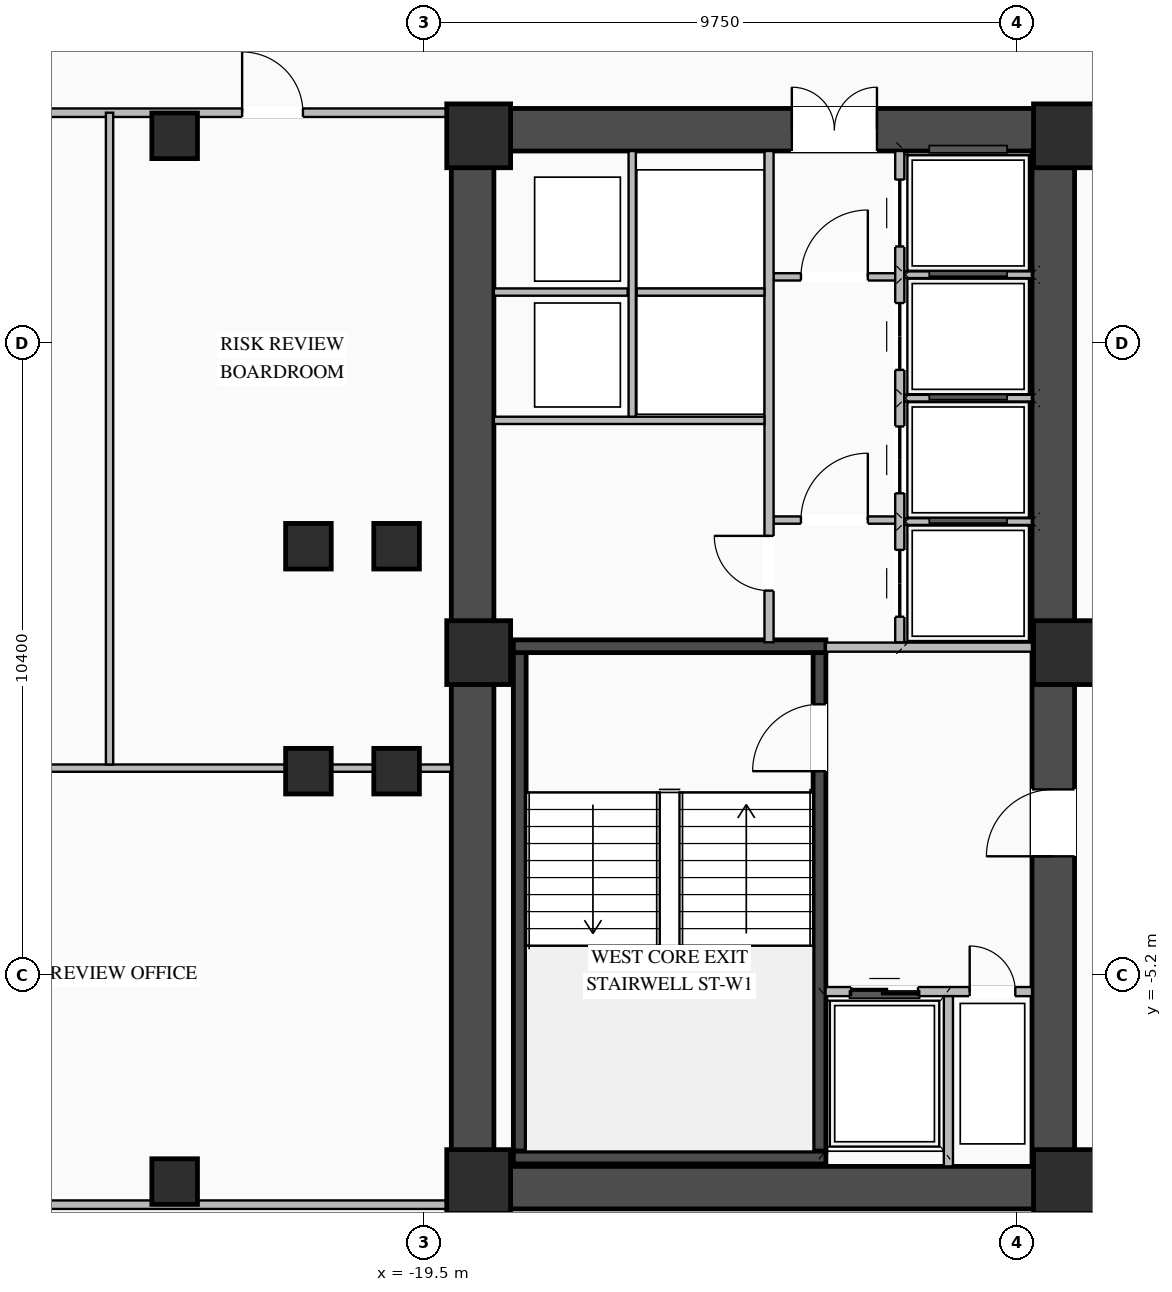
"""IFC4 building model, lengths in metres.
Left out: names, types, materials, properties, quantities, classifications, styles, units other than length and angle.
Written with IfcOpenShell. Run it as: python <this file> out.ifc"""

import sys

from ifc_helpers import new_model, si_unit, direction, frame, frame_2d, origin, origin_2d, place, context, subcontext, project, spatial, rectangle, i_section, extrude, element, fill, save


model = new_model("IFC4")
c1 = context("Model", 3, precision=1e-05, world=origin(), true_north=direction((0.0, 1.0)))
c2 = subcontext(c1, "Body", "Model", "MODEL_VIEW")
j1 = project(units=[si_unit("LENGTHUNIT", "METRE"), si_unit("PLANEANGLEUNIT", "RADIAN")], contexts=[c1])
p1 = place(None, origin())
s1 = spatial("IfcSite", under=j1, at=p1, CompositionType="ELEMENT")
p2 = place(p1, origin())
s2 = spatial("IfcBuilding", under=s1, at=p2, CompositionType="ELEMENT")
p3 = place(p2, frame((0.0, 0.0, 94.9)))
s3 = spatial("IfcBuildingStorey", under=s2, at=p3, CompositionType="ELEMENT", Elevation=94.9)
p4 = place(p3, frame((-19.05, -8.7, 0.0), z_axis=(0.0, 0.0, 1.0), x_axis=(1.0, 0.0, 0.0)))
e1 = element("IfcWall", 1, at=p4, inside=s3, PredefinedType="SHEAR", context=c2, shape_type="SweptSolid", body=[
    extrude(rectangle(XDim=10.25, YDim=0.7, at=frame_2d((5.125, 0.0))), origin(), (0.0, 0.0, 1.0), 3.27),
])
p5 = place(p3, frame((-19.05, 8.7, 0.0), z_axis=(0.0, 0.0, 1.0), x_axis=(1.0, 0.0, 0.0)))
e2 = element("IfcWall", 2, at=p5, inside=s3, PredefinedType="SHEAR", context=c2, shape_type="SweptSolid", body=[
    extrude(rectangle(XDim=10.25, YDim=0.7, at=frame_2d((5.125, 0.0))), origin(), (0.0, 0.0, 1.0), 3.27),
])
p6 = place(p5, frame((5.6, 0.0, 0.0)))
e3 = element("IfcOpeningElement", 3, at=p6, cuts=e2, PredefinedType="OPENING", context=c2, shape_type="SweptSolid", body=[
    extrude(rectangle(XDim=1.4, YDim=2.05, at=frame_2d((0.7, 1.025))), frame((0.0, 0.36, 0.0), z_axis=(0.0, -1.0, 0.0), x_axis=(1.0, 0.0, 0.0)), (0.0, 0.0, 1.0), 0.72),
])
p7 = place(p3, frame((-18.7, -8.35, 0.0), z_axis=(0.0, 0.0, 1.0), x_axis=(0.0, 1.0, 0.0)))
e4 = element("IfcWall", 4, at=p7, inside=s3, PredefinedType="SHEAR", context=c2, shape_type="SweptSolid", body=[
    extrude(rectangle(XDim=16.7, YDim=0.7, at=frame_2d((8.35, 0.0))), origin(), (0.0, 0.0, 1.0), 3.27),
])
p8 = place(p3, frame((-9.15, -8.35, 0.0), z_axis=(0.0, 0.0, 1.0), x_axis=(0.0, 1.0, 0.0)))
e5 = element("IfcWall", 5, at=p8, inside=s3, PredefinedType="SHEAR", context=c2, shape_type="SweptSolid", body=[
    extrude(rectangle(XDim=16.7, YDim=0.7, at=frame_2d((8.35, 0.0))), origin(), (0.0, 0.0, 1.0), 3.27),
])
p9 = place(p8, frame((5.1, 0.0, 0.0)))
e6 = element("IfcOpeningElement", 6, at=p9, cuts=e5, PredefinedType="OPENING", context=c2, shape_type="SweptSolid", body=[
    extrude(rectangle(XDim=1.1, YDim=2.08, at=frame_2d((0.55, 1.04))), frame((0.0, 0.36, 0.0), z_axis=(0.0, -1.0, 0.0), x_axis=(1.0, 0.0, 0.0)), (0.0, 0.0, 1.0), 0.72),
])
p10 = place(p3, frame((-12.995, -8.1, 0.0), z_axis=(0.0, 0.0, 1.0), x_axis=(0.0, 1.0, 0.0)))
e7 = element("IfcWall", 7, at=p10, inside=s3, PredefinedType="SHEAR", context=c2, shape_type="SweptSolid", body=[
    extrude(rectangle(XDim=8.2, YDim=0.21, at=frame_2d((4.1, 0.0))), origin(), (0.0, 0.0, 1.0), 3.27),
])
p11 = place(p10, frame((6.25, 0.0, 0.0)))
e8 = element("IfcOpeningElement", 8, at=p11, cuts=e7, PredefinedType="OPENING", context=c2, shape_type="SweptSolid", body=[
    extrude(rectangle(XDim=1.1, YDim=2.15, at=frame_2d((0.55, 1.075))), frame((0.0, 0.115, 0.0), z_axis=(0.0, -1.0, 0.0), x_axis=(1.0, 0.0, 0.0)), (0.0, 0.0, 1.0), 0.23),
])
p12 = place(p3, frame((-17.925, -8.1, 0.0), z_axis=(0.0, 0.0, 1.0), x_axis=(0.0, 1.0, 0.0)))
e9 = element("IfcWall", 9, at=p12, inside=s3, PredefinedType="SHEAR", context=c2, shape_type="SweptSolid", body=[
    extrude(rectangle(XDim=8.2, YDim=0.21, at=frame_2d((4.1, 0.0))), origin(), (0.0, 0.0, 1.0), 3.27),
])
for number, where, z_axis, x_axis in (
    (10, (-18.03, -8.205, 0.0), (0.0, 0.0, 1.0), (1.0, 0.0, 0.0)),
    (11, (-12.89, 0.205, 0.0), (0.0, 0.0, 1.0), (-1.0, 0.0, 0.0)),
):
    element("IfcWall", number, at=place(p3, frame(where, z_axis=z_axis, x_axis=x_axis)), inside=s3, PredefinedType="SHEAR", context=c2, shape_type="SweptSolid", body=[
        extrude(rectangle(XDim=5.14, YDim=0.21, at=frame_2d((2.57, 0.0))), origin(), (0.0, 0.0, 1.0), 3.27),
    ])
for number, where, z_axis, x_axis in (
    (12, (-8.95, -8.6, 0.0), (0.0, 0.0, 1.0), (1.0, 0.0, 0.0)),
    (13, (-8.95, 0.1, 0.0), (0.0, 0.0, 1.0), (1.0, 0.0, 0.0)),
    (14, (-8.95, 8.6, 0.0), (0.0, 0.0, 1.0), (1.0, 0.0, 0.0)),
    (15, (-18.6, -8.6, 0.0), (0.0, 0.0, 1.0), (1.0, 0.0, 0.0)),
    (16, (-18.6, 0.1, 0.0), (0.0, 0.0, 1.0), (1.0, 0.0, 0.0)),
    (17, (-18.6, 8.6, 0.0), (0.0, 0.0, 1.0), (1.0, 0.0, 0.0)),
):
    element("IfcColumn", number, at=place(p3, frame(where, z_axis=z_axis, x_axis=x_axis)), inside=s3, PredefinedType="COLUMN", context=c2, shape_type="SweptSolid", body=[
        extrude(rectangle(XDim=1.05, YDim=1.05, at=origin_2d()), origin(), (0.0, 0.0, 1.0), 3.45),
    ])
for number, where, z_axis, x_axis in (
    (18, (-21.4, -1.85, 0.0), (0.0, 0.0, 1.0), (1.0, 0.0, 0.0)),
    (19, (-21.4, 1.85, 0.0), (0.0, 0.0, 1.0), (1.0, 0.0, 0.0)),
    (20, (-19.95, -1.85, 0.0), (0.0, 0.0, 1.0), (1.0, 0.0, 0.0)),
    (21, (-19.95, 1.85, 0.0), (0.0, 0.0, 1.0), (1.0, 0.0, 0.0)),
    (22, (-23.6, -8.6, 0.0), (0.0, 0.0, 1.0), (1.0, 0.0, 0.0)),
    (23, (-23.6, 8.6, 0.0), (0.0, 0.0, 1.0), (1.0, 0.0, 0.0)),
):
    element("IfcColumn", number, at=place(p3, frame(where, z_axis=z_axis, x_axis=x_axis)), inside=s3, PredefinedType="COLUMN", context=c2, shape_type="SweptSolid", body=[
        extrude(i_section(OverallWidth=0.75, OverallDepth=0.75, WebThickness=0.03, FlangeThickness=0.044, at=origin_2d()), origin(), (0.0, 0.0, 1.0), 3.45),
    ])
p13 = place(p3, frame((-12.895, -5.475, 0.0), z_axis=(0.0, 0.0, 1.0), x_axis=(1.0, 0.0, 0.0)))
e24 = element("IfcWall", 24, at=p13, inside=s3, PredefinedType="STANDARD", context=c2, shape_type="SweptSolid", body=[
    extrude(rectangle(XDim=3.395, YDim=0.15, at=frame_2d((1.698, 0.0))), origin(), (0.0, 0.0, 1.0), 3.25),
])
p14 = place(p13, frame((0.42, 0.0, 0.0)))
e25 = element("IfcOpeningElement", 25, at=p14, cuts=e24, PredefinedType="OPENING", context=c2, shape_type="SweptSolid", body=[
    extrude(rectangle(XDim=1.1, YDim=2.15, at=frame_2d((0.55, 1.075))), frame((0.0, 0.085, 0.0), z_axis=(0.0, -1.0, 0.0), x_axis=(1.0, 0.0, 0.0)), (0.0, 0.0, 1.0), 0.17),
])
p15 = place(p13, frame((2.37, 0.0, 0.0)))
e26 = element("IfcOpeningElement", 26, at=p15, cuts=e24, PredefinedType="OPENING", context=c2, shape_type="SweptSolid", body=[
    extrude(rectangle(XDim=0.75, YDim=2.05, at=frame_2d((0.375, 1.025))), frame((0.0, 0.085, 0.0), z_axis=(0.0, -1.0, 0.0), x_axis=(1.0, 0.0, 0.0)), (0.0, 0.0, 1.0), 0.17),
])
p16 = place(p3, frame((-10.875, -8.35, 0.0), z_axis=(0.0, 0.0, 1.0), x_axis=(0.0, 1.0, 0.0)))
e27 = element("IfcWall", 27, at=p16, inside=s3, PredefinedType="STANDARD", context=c2, shape_type="SweptSolid", body=[
    extrude(rectangle(XDim=2.8, YDim=0.15, at=frame_2d((1.4, 0.0))), origin(), (0.0, 0.0, 1.0), 3.25),
])
p17 = place(p3, frame((-12.89, 0.19, 0.0), z_axis=(0.0, 0.0, 1.0), x_axis=(1.0, 0.0, 0.0)))
e28 = element("IfcWall", 28, at=p17, inside=s3, PredefinedType="STANDARD", context=c2, shape_type="SweptSolid", body=[
    extrude(rectangle(XDim=3.39, YDim=0.15, at=frame_2d((1.695, 0.0))), origin(), (0.0, 0.0, 1.0), 2.645),
])
p18 = place(p3, frame((-13.75, 2.28, 0.0), z_axis=(0.0, 0.0, 1.0), x_axis=(1.0, 0.0, 0.0)))
e29 = element("IfcWall", 29, at=p18, inside=s3, PredefinedType="STANDARD", context=c2, shape_type="SweptSolid", body=[
    extrude(rectangle(XDim=2.0, YDim=0.12, at=frame_2d((1.0, 0.0))), origin(), (0.0, 0.0, 1.0), 3.25),
])
p19 = place(p18, frame((0.45, 0.0, 0.0)))
e30 = element("IfcOpeningElement", 30, at=p19, cuts=e29, PredefinedType="OPENING", context=c2, shape_type="SweptSolid", body=[
    extrude(rectangle(XDim=1.1, YDim=2.1, at=frame_2d((0.55, 1.05))), frame((0.0, 0.07, 0.0), z_axis=(0.0, -1.0, 0.0), x_axis=(1.0, 0.0, 0.0)), (0.0, 0.0, 1.0), 0.14),
])
p20 = place(p3, frame((-13.75, 6.28, 0.0), z_axis=(0.0, 0.0, 1.0), x_axis=(1.0, 0.0, 0.0)))
e31 = element("IfcWall", 31, at=p20, inside=s3, PredefinedType="STANDARD", context=c2, shape_type="SweptSolid", body=[
    extrude(rectangle(XDim=2.0, YDim=0.12, at=frame_2d((1.0, 0.0))), origin(), (0.0, 0.0, 1.0), 3.25),
])
p21 = place(p20, frame((0.45, 0.0, 0.0)))
e32 = element("IfcOpeningElement", 32, at=p21, cuts=e31, PredefinedType="OPENING", context=c2, shape_type="SweptSolid", body=[
    extrude(rectangle(XDim=1.1, YDim=2.1, at=frame_2d((0.55, 1.05))), frame((0.0, 0.07, 0.0), z_axis=(0.0, -1.0, 0.0), x_axis=(1.0, 0.0, 0.0)), (0.0, 0.0, 1.0), 0.14),
])
p22 = place(p3, frame((-11.675, 0.27, 0.0), z_axis=(0.0, 0.0, 1.0), x_axis=(0.0, 1.0, 0.0)))
e33 = element("IfcWall", 33, at=p22, inside=s3, PredefinedType="STANDARD", context=c2, shape_type="SweptSolid", body=[
    extrude(rectangle(XDim=8.08, YDim=0.15, at=frame_2d((4.04, 0.0))), origin(), (0.0, 0.0, 1.0), 3.25),
])
p23 = place(p22, frame((0.42, 0.0, 0.0)))
e34 = element("IfcOpeningElement", 34, at=p23, cuts=e33, PredefinedType="OPENING", context=c2, shape_type="SweptSolid", body=[
    extrude(rectangle(XDim=1.1, YDim=2.1, at=frame_2d((0.55, 1.05))), frame((0.0, 0.085, 0.0), z_axis=(0.0, -1.0, 0.0), x_axis=(1.0, 0.0, 0.0)), (0.0, 0.0, 1.0), 0.17),
])
p24 = place(p22, frame((2.45, 0.0, 0.0)))
e35 = element("IfcOpeningElement", 35, at=p24, cuts=e33, PredefinedType="OPENING", context=c2, shape_type="SweptSolid", body=[
    extrude(rectangle(XDim=1.1, YDim=2.1, at=frame_2d((0.55, 1.05))), frame((0.0, 0.085, 0.0), z_axis=(0.0, -1.0, 0.0), x_axis=(1.0, 0.0, 0.0)), (0.0, 0.0, 1.0), 0.17),
])
p25 = place(p22, frame((4.48, 0.0, 0.0)))
e36 = element("IfcOpeningElement", 36, at=p25, cuts=e33, PredefinedType="OPENING", context=c2, shape_type="SweptSolid", body=[
    extrude(rectangle(XDim=1.1, YDim=2.1, at=frame_2d((0.55, 1.05))), frame((0.0, 0.085, 0.0), z_axis=(0.0, -1.0, 0.0), x_axis=(1.0, 0.0, 0.0)), (0.0, 0.0, 1.0), 0.17),
])
p26 = place(p22, frame((6.51, 0.0, 0.0)))
e37 = element("IfcOpeningElement", 37, at=p26, cuts=e33, PredefinedType="OPENING", context=c2, shape_type="SweptSolid", body=[
    extrude(rectangle(XDim=1.1, YDim=2.1, at=frame_2d((0.55, 1.05))), frame((0.0, 0.085, 0.0), z_axis=(0.0, -1.0, 0.0), x_axis=(1.0, 0.0, 0.0)), (0.0, 0.0, 1.0), 0.17),
])
for number, where, z_axis, x_axis in (
    (38, (-11.6, 2.255, 0.0), (0.0, 0.0, 1.0), (1.0, 0.0, 0.0)),
    (39, (-11.6, 4.285, 0.0), (0.0, 0.0, 1.0), (1.0, 0.0, 0.0)),
    (40, (-11.6, 6.315, 0.0), (0.0, 0.0, 1.0), (1.0, 0.0, 0.0)),
):
    element("IfcWall", number, at=place(p3, frame(where, z_axis=z_axis, x_axis=x_axis)), inside=s3, PredefinedType="STANDARD", context=c2, shape_type="SweptSolid", body=[
        extrude(rectangle(XDim=2.1, YDim=0.11, at=frame_2d((1.05, 0.0))), origin(), (0.0, 0.0, 1.0), 3.25),
    ])
p27 = place(p3, frame((-13.825, 0.27, 0.0), z_axis=(0.0, 0.0, 1.0), x_axis=(0.0, 1.0, 0.0)))
e41 = element("IfcWall", 41, at=p27, inside=s3, PredefinedType="STANDARD", context=c2, shape_type="SweptSolid", body=[
    extrude(rectangle(XDim=8.08, YDim=0.15, at=frame_2d((4.04, 0.0))), origin(), (0.0, 0.0, 1.0), 3.25),
])
p28 = place(p27, frame((0.85, 0.0, 0.0)))
e42 = element("IfcOpeningElement", 42, at=p28, cuts=e41, PredefinedType="OPENING", context=c2, shape_type="SweptSolid", body=[
    extrude(rectangle(XDim=0.9, YDim=2.05, at=frame_2d((0.45, 1.025))), frame((0.0, 0.085, 0.0), z_axis=(0.0, -1.0, 0.0), x_axis=(1.0, 0.0, 0.0)), (0.0, 0.0, 1.0), 0.17),
])
p29 = place(p3, frame((-18.35, 3.92, 0.0), z_axis=(0.0, 0.0, 1.0), x_axis=(1.0, 0.0, 0.0)))
e43 = element("IfcWall", 43, at=p29, inside=s3, PredefinedType="STANDARD", context=c2, shape_type="SweptSolid", body=[
    extrude(rectangle(XDim=4.45, YDim=0.12, at=frame_2d((2.225, 0.0))), origin(), (0.0, 0.0, 1.0), 3.25),
])
p30 = place(p3, frame((-18.35, 6.03, 0.0), z_axis=(0.0, 0.0, 1.0), x_axis=(1.0, 0.0, 0.0)))
e44 = element("IfcWall", 44, at=p30, inside=s3, PredefinedType="STANDARD", context=c2, shape_type="SweptSolid", body=[
    extrude(rectangle(XDim=2.2, YDim=0.12, at=frame_2d((1.1, 0.0))), origin(), (0.0, 0.0, 1.0), 3.25),
])
p31 = place(p3, frame((-16.075, 3.98, 0.0), z_axis=(0.0, 0.0, 1.0), x_axis=(0.0, 1.0, 0.0)))
e45 = element("IfcWall", 45, at=p31, inside=s3, PredefinedType="STANDARD", context=c2, shape_type="SweptSolid", body=[
    extrude(rectangle(XDim=4.37, YDim=0.12, at=frame_2d((2.185, 0.0))), origin(), (0.0, 0.0, 1.0), 3.25),
])
p32 = place(p3, frame((-16.0, 6.03, 0.0), z_axis=(0.0, 0.0, 1.0), x_axis=(1.0, 0.0, 0.0)))
e46 = element("IfcWall", 46, at=p32, inside=s3, PredefinedType="STANDARD", context=c2, shape_type="SweptSolid", body=[
    extrude(rectangle(XDim=2.1, YDim=0.12, at=frame_2d((1.05, 0.0))), origin(), (0.0, 0.0, 1.0), 3.25),
])
p33 = place(p3, frame((-30.351, 8.98, 0.0), z_axis=(0.0, 0.0, 1.0), x_axis=(1.0, 0.0, 0.0)))
e47 = element("IfcWall", 47, at=p33, inside=s3, PredefinedType="STANDARD", context=c2, shape_type="SweptSolid", body=[
    extrude(rectangle(XDim=11.301, YDim=0.14, at=frame_2d((5.651, 0.0))), origin(), (0.0, 0.0, 1.0), 3.25),
])
p34 = place(p33, frame((2.9, 0.0, 0.0)))
e48 = element("IfcOpeningElement", 48, at=p34, cuts=e47, PredefinedType="OPENING", context=c2, shape_type="SweptSolid", body=[
    extrude(rectangle(XDim=1.0, YDim=2.08, at=frame_2d((0.5, 1.04))), frame((0.0, 0.08, 0.0), z_axis=(0.0, -1.0, 0.0), x_axis=(1.0, 0.0, 0.0)), (0.0, 0.0, 1.0), 0.16),
])
p35 = place(p33, frame((7.861, 0.0, 0.0)))
e49 = element("IfcOpeningElement", 49, at=p35, cuts=e47, PredefinedType="OPENING", context=c2, shape_type="SweptSolid", body=[
    extrude(rectangle(XDim=1.0, YDim=2.08, at=frame_2d((0.5, 1.04))), frame((0.0, 0.08, 0.0), z_axis=(0.0, -1.0, 0.0), x_axis=(1.0, 0.0, 0.0)), (0.0, 0.0, 1.0), 0.16),
])
p36 = place(p3, frame((-28.622, -8.98, 0.0), z_axis=(0.0, 0.0, 1.0), x_axis=(1.0, 0.0, 0.0)))
e50 = element("IfcWall", 50, at=p36, inside=s3, PredefinedType="STANDARD", context=c2, shape_type="SweptSolid", body=[
    extrude(rectangle(XDim=9.572, YDim=0.14, at=frame_2d((4.786, 0.0))), origin(), (0.0, 0.0, 1.0), 3.25),
])
p37 = place(p36, frame((1.177, 0.0, 0.0)))
e51 = element("IfcOpeningElement", 51, at=p37, cuts=e50, PredefinedType="OPENING", context=c2, shape_type="SweptSolid", body=[
    extrude(rectangle(XDim=1.0, YDim=2.08, at=frame_2d((0.5, 1.04))), frame((0.0, 0.08, 0.0), z_axis=(0.0, -1.0, 0.0), x_axis=(1.0, 0.0, 0.0)), (0.0, 0.0, 1.0), 0.16),
])
p38 = place(p3, frame((-29.313, -1.8, 0.0), z_axis=(0.0, 0.0, 1.0), x_axis=(1.0, 0.0, 0.0)))
e52 = element("IfcWall", 52, at=p38, inside=s3, PredefinedType="STANDARD", context=c2, shape_type="SweptSolid", body=[
    extrude(rectangle(XDim=10.263, YDim=0.12, at=frame_2d((5.132, 0.0))), origin(), (0.0, 0.0, 1.0), 3.25),
])
p39 = place(p3, frame((-24.671, -1.74, 0.0), z_axis=(0.0, 0.0, 1.0), x_axis=(0.0, 1.0, 0.0)))
e53 = element("IfcWall", 53, at=p39, inside=s3, PredefinedType="STANDARD", context=c2, shape_type="SweptSolid", body=[
    extrude(rectangle(XDim=10.72, YDim=0.12, at=frame_2d((5.36, 0.0))), origin(), (0.0, 0.0, 1.0), 3.25),
])
p40 = place(p11, origin())
e54 = element("IfcDoor", 54, at=p40, inside=s3, OperationType="SINGLE_SWING_LEFT", PredefinedType="DOOR", context=c2, shape_type="SweptSolid", body=[
    extrude(rectangle(XDim=1.1, YDim=2.15, at=frame_2d((0.55, 1.075))), frame((0.0, 0.025, 0.0), z_axis=(0.0, -1.0, 0.0), x_axis=(1.0, 0.0, 0.0)), (0.0, 0.0, 1.0), 0.05),
])
fill(e8, e54)
p41 = place(p14, origin())
e55 = element("IfcDoor", 55, at=p41, inside=s3, OperationType="DOUBLE_DOOR_SLIDING", PredefinedType="DOOR", context=c2, shape_type="SweptSolid", body=[
    extrude(rectangle(XDim=1.1, YDim=2.15, at=frame_2d((0.55, 1.075))), frame((0.0, 0.025, 0.0), z_axis=(0.0, -1.0, 0.0), x_axis=(1.0, 0.0, 0.0)), (0.0, 0.0, 1.0), 0.05),
])
fill(e25, e55)
p42 = place(p15, origin())
e56 = element("IfcDoor", 56, at=p42, inside=s3, OperationType="SINGLE_SWING_LEFT", PredefinedType="DOOR", context=c2, shape_type="SweptSolid", body=[
    extrude(rectangle(XDim=0.75, YDim=2.05, at=frame_2d((0.375, 1.025))), frame((0.0, 0.025, 0.0), z_axis=(0.0, -1.0, 0.0), x_axis=(1.0, 0.0, 0.0)), (0.0, 0.0, 1.0), 0.05),
])
fill(e26, e56)
p43 = place(p9, origin())
e57 = element("IfcDoor", 57, at=p43, inside=s3, OperationType="SINGLE_SWING_LEFT", PredefinedType="DOOR", context=c2, shape_type="SweptSolid", body=[
    extrude(rectangle(XDim=1.1, YDim=2.08, at=frame_2d((0.55, 1.04))), frame((0.0, 0.305, 0.0), z_axis=(0.0, -1.0, 0.0), x_axis=(1.0, 0.0, 0.0)), (0.0, 0.0, 1.0), 0.05),
])
fill(e6, e57)
p44 = place(p19, origin())
e58 = element("IfcDoor", 58, at=p44, inside=s3, OperationType="SINGLE_SWING_RIGHT", PredefinedType="DOOR", context=c2, shape_type="SweptSolid", body=[
    extrude(rectangle(XDim=1.1, YDim=2.1, at=frame_2d((0.55, 1.05))), frame((0.0, 0.025, 0.0), z_axis=(0.0, -1.0, 0.0), x_axis=(1.0, 0.0, 0.0)), (0.0, 0.0, 1.0), 0.05),
])
fill(e30, e58)
p45 = place(p21, origin())
e59 = element("IfcDoor", 59, at=p45, inside=s3, OperationType="SINGLE_SWING_RIGHT", PredefinedType="DOOR", context=c2, shape_type="SweptSolid", body=[
    extrude(rectangle(XDim=1.1, YDim=2.1, at=frame_2d((0.55, 1.05))), frame((0.0, 0.025, 0.0), z_axis=(0.0, -1.0, 0.0), x_axis=(1.0, 0.0, 0.0)), (0.0, 0.0, 1.0), 0.05),
])
fill(e32, e59)
p46 = place(p6, origin())
e60 = element("IfcDoor", 60, at=p46, inside=s3, OperationType="DOUBLE_DOOR_SINGLE_SWING", PredefinedType="DOOR", context=c2, shape_type="SweptSolid", body=[
    extrude(rectangle(XDim=1.4, YDim=2.05, at=frame_2d((0.7, 1.025))), frame((0.0, 0.295, 0.0), z_axis=(0.0, -1.0, 0.0), x_axis=(1.0, 0.0, 0.0)), (0.0, 0.0, 1.0), 0.05),
])
fill(e3, e60)
p47 = place(p23, origin())
e61 = element("IfcDoor", 61, at=p47, inside=s3, OperationType="DOUBLE_DOOR_SLIDING", PredefinedType="DOOR", context=c2, shape_type="SweptSolid", body=[
    extrude(rectangle(XDim=1.1, YDim=2.1, at=frame_2d((0.55, 1.05))), frame((0.0, 0.025, 0.0), z_axis=(0.0, -1.0, 0.0), x_axis=(1.0, 0.0, 0.0)), (0.0, 0.0, 1.0), 0.05),
])
fill(e34, e61)
p48 = place(p24, origin())
e62 = element("IfcDoor", 62, at=p48, inside=s3, OperationType="DOUBLE_DOOR_SLIDING", PredefinedType="DOOR", context=c2, shape_type="SweptSolid", body=[
    extrude(rectangle(XDim=1.1, YDim=2.1, at=frame_2d((0.55, 1.05))), frame((0.0, 0.025, 0.0), z_axis=(0.0, -1.0, 0.0), x_axis=(1.0, 0.0, 0.0)), (0.0, 0.0, 1.0), 0.05),
])
fill(e35, e62)
p49 = place(p25, origin())
e63 = element("IfcDoor", 63, at=p49, inside=s3, OperationType="DOUBLE_DOOR_SLIDING", PredefinedType="DOOR", context=c2, shape_type="SweptSolid", body=[
    extrude(rectangle(XDim=1.1, YDim=2.1, at=frame_2d((0.55, 1.05))), frame((0.0, 0.025, 0.0), z_axis=(0.0, -1.0, 0.0), x_axis=(1.0, 0.0, 0.0)), (0.0, 0.0, 1.0), 0.05),
])
fill(e36, e63)
p50 = place(p26, origin())
e64 = element("IfcDoor", 64, at=p50, inside=s3, OperationType="DOUBLE_DOOR_SLIDING", PredefinedType="DOOR", context=c2, shape_type="SweptSolid", body=[
    extrude(rectangle(XDim=1.1, YDim=2.1, at=frame_2d((0.55, 1.05))), frame((0.0, 0.025, 0.0), z_axis=(0.0, -1.0, 0.0), x_axis=(1.0, 0.0, 0.0)), (0.0, 0.0, 1.0), 0.05),
])
fill(e37, e64)
p51 = place(p28, origin())
e65 = element("IfcDoor", 65, at=p51, inside=s3, OperationType="SINGLE_SWING_RIGHT", PredefinedType="DOOR", context=c2, shape_type="SweptSolid", body=[
    extrude(rectangle(XDim=0.9, YDim=2.05, at=frame_2d((0.45, 1.025))), frame((0.0, 0.025, 0.0), z_axis=(0.0, -1.0, 0.0), x_axis=(1.0, 0.0, 0.0)), (0.0, 0.0, 1.0), 0.05),
])
fill(e42, e65)
p52 = place(p35, origin())
e66 = element("IfcDoor", 66, at=p52, inside=s3, OperationType="SINGLE_SWING_LEFT", PredefinedType="DOOR", context=c2, shape_type="SweptSolid", body=[
    extrude(rectangle(XDim=1.0, YDim=2.08, at=frame_2d((0.5, 1.04))), frame((0.0, 0.025, 0.0), z_axis=(0.0, -1.0, 0.0), x_axis=(1.0, 0.0, 0.0)), (0.0, 0.0, 1.0), 0.05),
])
fill(e49, e66)
save(model, sys.argv[1])
